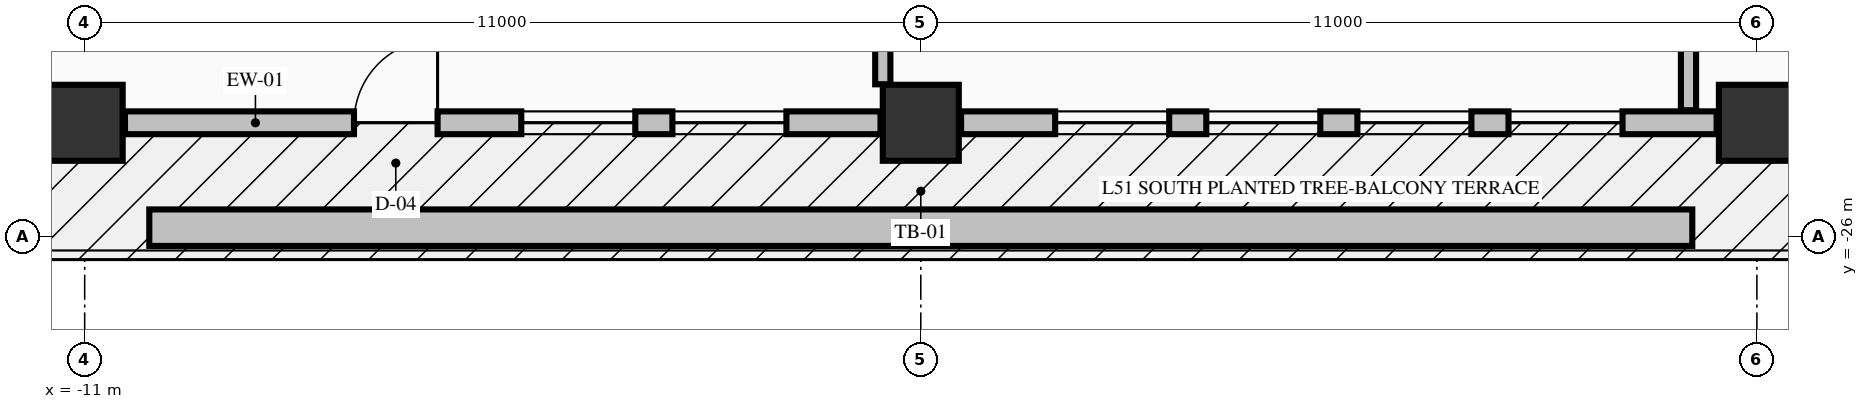
"""IFC4 building model, lengths in metres.
Left out: names, types, materials, properties, quantities, classifications, styles, units other than length and angle.
Written with IfcOpenShell. Run it as: python <this file> out.ifc"""

import sys

from ifc_helpers import new_model, si_unit, direction, frame, frame_2d, origin, origin_2d, place, context, subcontext, project, spatial, rectangle, extrude, element, fill, save


model = new_model("IFC4")
c1 = context("Model", 3, precision=1e-05, world=origin(), true_north=direction((0.0, 1.0)))
c2 = subcontext(c1, "Body", "Model", "MODEL_VIEW")
j1 = project(units=[si_unit("LENGTHUNIT", "METRE"), si_unit("PLANEANGLEUNIT", "RADIAN")], contexts=[c1])
p1 = place(None, origin())
s1 = spatial("IfcSite", under=j1, at=p1, CompositionType="ELEMENT")
p2 = place(p1, origin())
s2 = spatial("IfcBuilding", under=s1, at=p2, CompositionType="ELEMENT")
p3 = place(p2, frame((0.0, 0.0, 198.26)))
s3 = spatial("IfcBuildingStorey", under=s2, at=p3, CompositionType="ELEMENT", Elevation=198.26)
for number, where, z_axis, x_axis in (
    (1, (-11.0, -24.5, -0.25), (0.0, 0.0, 1.0), (1.0, 0.0, 0.0)),
    (2, (0.0, -24.5, -0.25), (0.0, 0.0, 1.0), (1.0, 0.0, 0.0)),
    (3, (11.0, -24.5, -0.25), (0.0, 0.0, 1.0), (1.0, 0.0, 0.0)),
):
    element("IfcColumn", number, at=place(p3, frame(where, z_axis=z_axis, x_axis=x_axis)), inside=s3, PredefinedType="COLUMN", context=c2, shape_type="SweptSolid", body=[
        extrude(rectangle(XDim=1.0, YDim=1.0, at=origin_2d()), origin(), (0.0, 0.0, 1.0), 3.4),
    ])
p4 = place(p3, frame((-10.47, -24.5, 0.0), z_axis=(0.0, 0.0, 1.0), x_axis=(1.0, 0.0, 0.0)))
e4 = element("IfcWall", 4, at=p4, inside=s3, PredefinedType="STANDARD", context=c2, shape_type="SweptSolid", body=[
    extrude(rectangle(XDim=9.94, YDim=0.3, at=frame_2d((4.97, 0.0))), origin(), (0.0, 0.0, 1.0), 2.542),
])
p5 = place(p4, frame((3.013, 0.0, 0.0)))
e5 = element("IfcOpeningElement", 5, at=p5, cuts=e4, PredefinedType="OPENING", context=c2, shape_type="SweptSolid", body=[
    extrude(rectangle(XDim=1.1, YDim=2.15, at=frame_2d((0.55, 1.075))), frame((0.0, 0.16, 0.0), z_axis=(0.0, -1.0, 0.0), x_axis=(1.0, 0.0, 0.0)), (0.0, 0.0, 1.0), 0.32),
])
p6 = place(p4, frame((5.214, 0.0, 0.72)))
e6 = element("IfcOpeningElement", 6, at=p6, cuts=e4, PredefinedType="OPENING", context=c2, shape_type="SweptSolid", body=[
    extrude(rectangle(XDim=1.5, YDim=1.6, at=frame_2d((0.75, 0.8))), frame((0.0, 0.16, 0.0), z_axis=(0.0, -1.0, 0.0), x_axis=(1.0, 0.0, 0.0)), (0.0, 0.0, 1.0), 0.32),
])
p7 = place(p4, frame((7.202, 0.0, 0.72)))
e7 = element("IfcOpeningElement", 7, at=p7, cuts=e4, PredefinedType="OPENING", context=c2, shape_type="SweptSolid", body=[
    extrude(rectangle(XDim=1.5, YDim=1.6, at=frame_2d((0.75, 0.8))), frame((0.0, 0.16, 0.0), z_axis=(0.0, -1.0, 0.0), x_axis=(1.0, 0.0, 0.0)), (0.0, 0.0, 1.0), 0.32),
])
p8 = place(p3, frame((0.53, -24.5, 0.0), z_axis=(0.0, 0.0, 1.0), x_axis=(1.0, 0.0, 0.0)))
e8 = element("IfcWall", 8, at=p8, inside=s3, PredefinedType="STANDARD", context=c2, shape_type="SweptSolid", body=[
    extrude(rectangle(XDim=9.94, YDim=0.3, at=frame_2d((4.97, 0.0))), origin(), (0.0, 0.0, 1.0), 2.542),
])
p9 = place(p8, frame((1.238, 0.0, 0.72)))
e9 = element("IfcOpeningElement", 9, at=p9, cuts=e8, PredefinedType="OPENING", context=c2, shape_type="SweptSolid", body=[
    extrude(rectangle(XDim=1.5, YDim=1.6, at=frame_2d((0.75, 0.8))), frame((0.0, 0.16, 0.0), z_axis=(0.0, -1.0, 0.0), x_axis=(1.0, 0.0, 0.0)), (0.0, 0.0, 1.0), 0.32),
])
p10 = place(p8, frame((3.226, 0.0, 0.72)))
e10 = element("IfcOpeningElement", 10, at=p10, cuts=e8, PredefinedType="OPENING", context=c2, shape_type="SweptSolid", body=[
    extrude(rectangle(XDim=1.5, YDim=1.6, at=frame_2d((0.75, 0.8))), frame((0.0, 0.16, 0.0), z_axis=(0.0, -1.0, 0.0), x_axis=(1.0, 0.0, 0.0)), (0.0, 0.0, 1.0), 0.32),
])
p11 = place(p8, frame((5.214, 0.0, 0.72)))
e11 = element("IfcOpeningElement", 11, at=p11, cuts=e8, PredefinedType="OPENING", context=c2, shape_type="SweptSolid", body=[
    extrude(rectangle(XDim=1.5, YDim=1.6, at=frame_2d((0.75, 0.8))), frame((0.0, 0.16, 0.0), z_axis=(0.0, -1.0, 0.0), x_axis=(1.0, 0.0, 0.0)), (0.0, 0.0, 1.0), 0.32),
])
p12 = place(p8, frame((7.202, 0.0, 0.72)))
e12 = element("IfcOpeningElement", 12, at=p12, cuts=e8, PredefinedType="OPENING", context=c2, shape_type="SweptSolid", body=[
    extrude(rectangle(XDim=1.5, YDim=1.6, at=frame_2d((0.75, 0.8))), frame((0.0, 0.16, 0.0), z_axis=(0.0, -1.0, 0.0), x_axis=(1.0, 0.0, 0.0)), (0.0, 0.0, 1.0), 0.32),
])
p13 = place(p3, frame((-0.5, -23.994, 0.0), z_axis=(0.0, 0.0, 1.0), x_axis=(0.0, 1.0, 0.0)))
e13 = element("IfcWall", 13, at=p13, inside=s3, PredefinedType="PARTITIONING", context=c2, shape_type="SweptSolid", body=[
    extrude(rectangle(XDim=9.116, YDim=0.2, at=frame_2d((4.558, 0.0))), origin(), (0.0, 0.0, 1.0), 3.15),
])
p14 = place(p3, frame((10.1, -24.335, 0.0), z_axis=(0.0, 0.0, 1.0), x_axis=(0.0, 1.0, 0.0)))
e14 = element("IfcWall", 14, at=p14, inside=s3, PredefinedType="PARTITIONING", context=c2, shape_type="SweptSolid", body=[
    extrude(rectangle(XDim=8.757, YDim=0.2, at=frame_2d((4.378, 0.0))), origin(), (0.0, 0.0, 1.0), 3.15),
])
p15 = place(p3, frame((-10.15, -25.88, -0.04), z_axis=(0.0, 0.0, 1.0), x_axis=(1.0, 0.0, 0.0)))
e15 = element("IfcWall", 15, at=p15, inside=s3, PredefinedType="PARAPET", context=c2, shape_type="SweptSolid", body=[
    extrude(rectangle(XDim=20.3, YDim=0.48, at=frame_2d((10.15, 0.0))), origin(), (0.0, 0.0, 1.0), 0.52),
])
p16 = place(p5, origin())
e16 = element("IfcDoor", 16, at=p16, inside=s3, OperationType="SINGLE_SWING_RIGHT", PredefinedType="DOOR", context=c2, shape_type="SweptSolid", body=[
    extrude(rectangle(XDim=1.1, YDim=2.15, at=frame_2d((0.55, 1.075))), frame((0.0, 0.025, 0.0), z_axis=(0.0, -1.0, 0.0), x_axis=(1.0, 0.0, 0.0)), (0.0, 0.0, 1.0), 0.05),
])
fill(e5, e16)
p17 = place(p6, origin())
e17 = element("IfcWindow", 17, at=p17, inside=s3, PartitioningType="SINGLE_PANEL", PredefinedType="WINDOW", context=c2, shape_type="SweptSolid", body=[
    extrude(rectangle(XDim=1.5, YDim=1.6, at=frame_2d((0.75, 0.8))), frame((0.0, 0.03, 0.0), z_axis=(0.0, -1.0, 0.0), x_axis=(1.0, 0.0, 0.0)), (0.0, 0.0, 1.0), 0.06),
])
fill(e6, e17)
p18 = place(p7, origin())
e18 = element("IfcWindow", 18, at=p18, inside=s3, PartitioningType="SINGLE_PANEL", PredefinedType="WINDOW", context=c2, shape_type="SweptSolid", body=[
    extrude(rectangle(XDim=1.5, YDim=1.6, at=frame_2d((0.75, 0.8))), frame((0.0, 0.03, 0.0), z_axis=(0.0, -1.0, 0.0), x_axis=(1.0, 0.0, 0.0)), (0.0, 0.0, 1.0), 0.06),
])
fill(e7, e18)
p19 = place(p9, origin())
e19 = element("IfcWindow", 19, at=p19, inside=s3, PartitioningType="SINGLE_PANEL", PredefinedType="WINDOW", context=c2, shape_type="SweptSolid", body=[
    extrude(rectangle(XDim=1.5, YDim=1.6, at=frame_2d((0.75, 0.8))), frame((0.0, 0.03, 0.0), z_axis=(0.0, -1.0, 0.0), x_axis=(1.0, 0.0, 0.0)), (0.0, 0.0, 1.0), 0.06),
])
fill(e9, e19)
p20 = place(p10, origin())
e20 = element("IfcWindow", 20, at=p20, inside=s3, PartitioningType="SINGLE_PANEL", PredefinedType="WINDOW", context=c2, shape_type="SweptSolid", body=[
    extrude(rectangle(XDim=1.5, YDim=1.6, at=frame_2d((0.75, 0.8))), frame((0.0, 0.03, 0.0), z_axis=(0.0, -1.0, 0.0), x_axis=(1.0, 0.0, 0.0)), (0.0, 0.0, 1.0), 0.06),
])
fill(e10, e20)
p21 = place(p11, origin())
e21 = element("IfcWindow", 21, at=p21, inside=s3, PartitioningType="SINGLE_PANEL", PredefinedType="WINDOW", context=c2, shape_type="SweptSolid", body=[
    extrude(rectangle(XDim=1.5, YDim=1.6, at=frame_2d((0.75, 0.8))), frame((0.0, 0.03, 0.0), z_axis=(0.0, -1.0, 0.0), x_axis=(1.0, 0.0, 0.0)), (0.0, 0.0, 1.0), 0.06),
])
fill(e11, e21)
p22 = place(p12, origin())
e22 = element("IfcWindow", 22, at=p22, inside=s3, PartitioningType="SINGLE_PANEL", PredefinedType="WINDOW", context=c2, shape_type="SweptSolid", body=[
    extrude(rectangle(XDim=1.5, YDim=1.6, at=frame_2d((0.75, 0.8))), frame((0.0, 0.03, 0.0), z_axis=(0.0, -1.0, 0.0), x_axis=(1.0, 0.0, 0.0)), (0.0, 0.0, 1.0), 0.06),
])
fill(e12, e22)
save(model, sys.argv[1])
